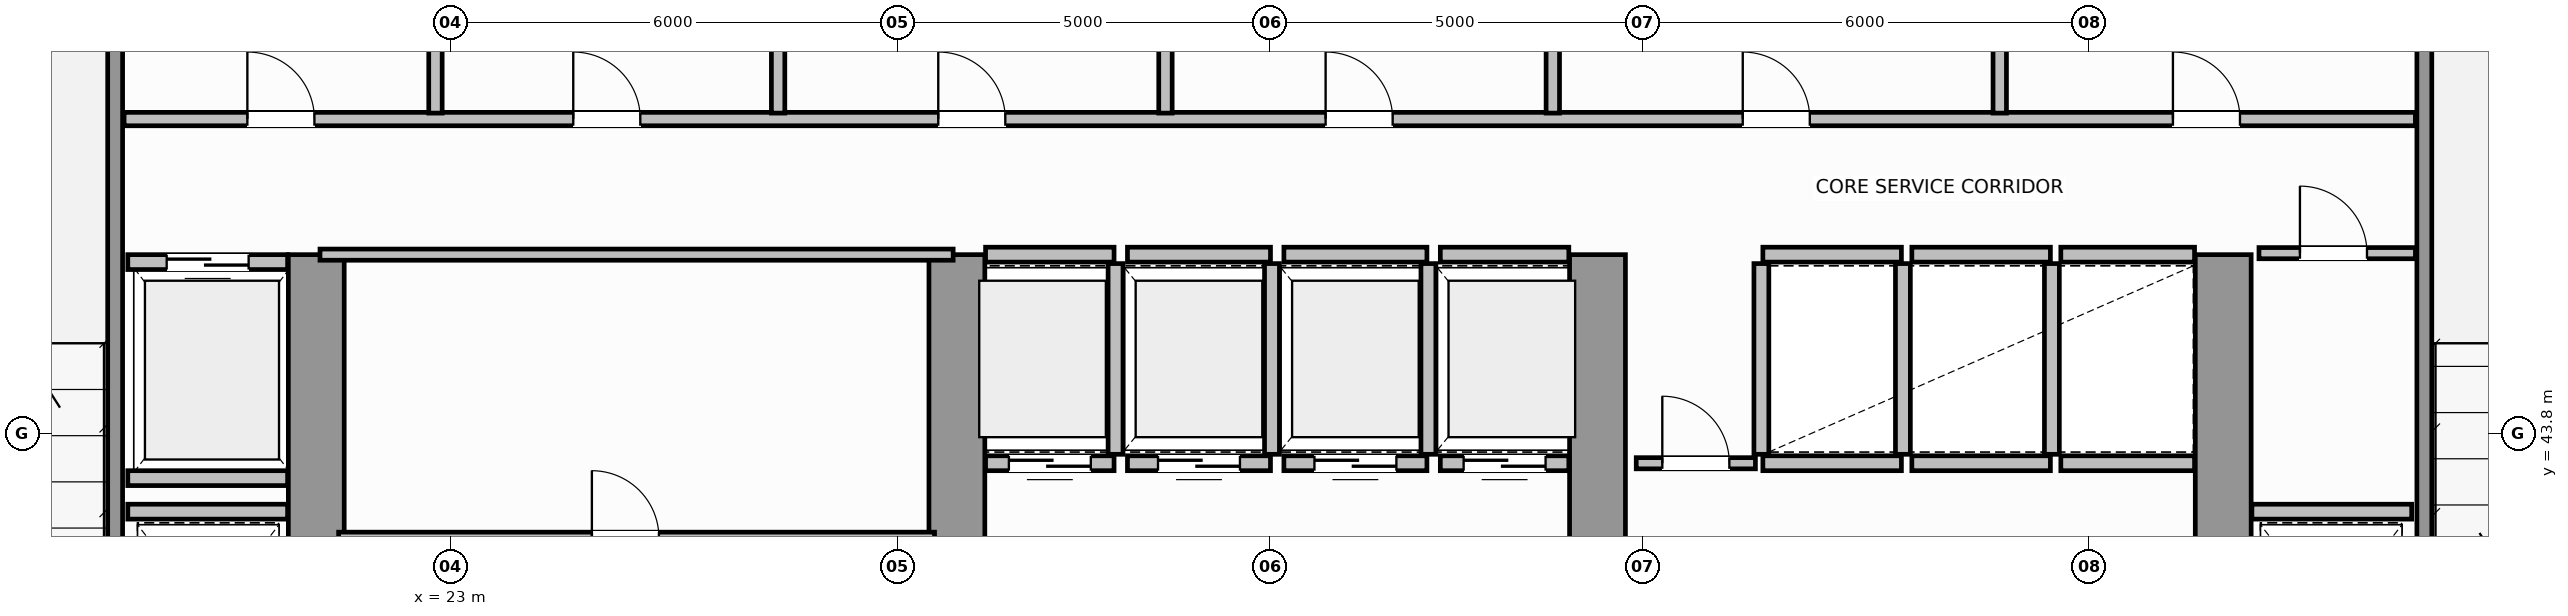
"""IFC4 building model, lengths in metres.
Left out: names, types, materials, properties, quantities, classifications, styles, units other than length and angle.
Written with IfcOpenShell. Run it as: python <this file> out.ifc"""

import sys

from ifc_helpers import new_model, si_unit, direction, frame, frame_2d, origin, place, context, subcontext, project, spatial, rectangle, extrude, source, transform, mapped, element, fill, save


model = new_model("IFC4")
c1 = context("Model", 3, precision=1e-05, world=origin(), true_north=direction((0.0, 1.0)))
c2 = subcontext(c1, "Body", "Model", "MODEL_VIEW")
j1 = project(units=[si_unit("LENGTHUNIT", "METRE"), si_unit("PLANEANGLEUNIT", "RADIAN")], contexts=[c1])
p1 = place(None, origin())
s1 = spatial("IfcSite", under=j1, at=p1, CompositionType="ELEMENT")
p2 = place(p1, origin())
s2 = spatial("IfcBuilding", under=s1, at=p2, CompositionType="ELEMENT")
p3 = place(p2, frame((0.0, 0.0, 157.6)))
s3 = spatial("IfcBuildingStorey", under=s2, at=p3, CompositionType="ELEMENT", Elevation=157.6)
for number, where, z_axis, x_axis in (
    (1, (21.2, 36.895, 0.0), (0.0, 0.0, 1.0), (0.0, 1.0, 0.0)),
    (2, (29.8, 36.895, 0.0), (0.0, 0.0, 1.0), (0.0, 1.0, 0.0)),
    (3, (38.4, 36.895, 0.0), (0.0, 0.0, 1.0), (0.0, 1.0, 0.0)),
    (4, (46.8, 36.895, 0.0), (0.0, 0.0, 1.0), (0.0, 1.0, 0.0)),
):
    element("IfcWall", number, at=place(p3, frame(where, z_axis=z_axis, x_axis=x_axis)), inside=s3, PredefinedType="SHEAR", context=c2, shape_type="SweptSolid", body=[
        extrude(rectangle(XDim=9.305, YDim=0.75, at=frame_2d((4.652, 0.0))), origin(), (0.0, 0.0, 1.0), 3.8),
    ])
for number, where, z_axis, x_axis in (
    (5, (18.5, 39.96, 0.0), (0.0, 0.0, 1.0), (0.0, 1.0, 0.0)),
    (6, (49.5, 39.96, 0.0), (0.0, 0.0, 1.0), (0.0, 1.0, 0.0)),
):
    element("IfcWall", number, at=place(p3, frame(where, z_axis=z_axis, x_axis=x_axis)), inside=s3, PredefinedType="SOLIDWALL", context=c2, shape_type="SweptSolid", body=[
        extrude(rectangle(XDim=9.93, YDim=0.2, at=frame_2d((4.965, 0.0))), origin(), (0.0, 0.0, 1.0), 3.8),
    ])
p4 = place(p3, frame((30.185, 43.4, 0.0), z_axis=(0.0, 0.0, 1.0), x_axis=(1.0, 0.0, 0.0)))
e7 = element("IfcWall", 7, at=p4, inside=s3, PredefinedType="SOLIDWALL", context=c2, shape_type="SweptSolid", body=[
    extrude(rectangle(XDim=1.725, YDim=0.2, at=frame_2d((0.862, 0.0))), origin(), (0.0, 0.0, 1.0), 3.58),
])
p5 = place(p4, frame((0.313, 0.0, 0.0)))
e8 = element("IfcOpeningElement", 8, at=p5, cuts=e7, PredefinedType="OPENING", context=c2, shape_type="SweptSolid", body=[
    extrude(rectangle(XDim=1.1, YDim=2.15, at=frame_2d((0.55, 1.075))), frame((0.0, 0.11, 0.0), z_axis=(0.0, -1.0, 0.0), x_axis=(1.0, 0.0, 0.0)), (0.0, 0.0, 1.0), 0.22),
])
p6 = place(p3, frame((30.185, 46.2, 0.0), z_axis=(0.0, 0.0, 1.0), x_axis=(1.0, 0.0, 0.0)))
e9 = element("IfcWall", 9, at=p6, inside=s3, PredefinedType="SOLIDWALL", context=c2, shape_type="SweptSolid", body=[
    extrude(rectangle(XDim=1.725, YDim=0.2, at=frame_2d((0.862, 0.0))), origin(), (0.0, 0.0, 1.0), 3.58),
])
p7 = place(p3, frame((31.93, 43.52, 0.0), z_axis=(0.0, 0.0, 1.0), x_axis=(0.0, 1.0, 0.0)))
e10 = element("IfcWall", 10, at=p7, inside=s3, PredefinedType="SOLIDWALL", context=c2, shape_type="SweptSolid", body=[
    extrude(rectangle(XDim=2.56, YDim=0.2, at=frame_2d((1.28, 0.0))), origin(), (0.0, 0.0, 1.0), 3.58),
])
p8 = place(p3, frame((32.09, 43.4, 0.0), z_axis=(0.0, 0.0, 1.0), x_axis=(1.0, 0.0, 0.0)))
e11 = element("IfcWall", 11, at=p8, inside=s3, PredefinedType="SOLIDWALL", context=c2, shape_type="SweptSolid", body=[
    extrude(rectangle(XDim=1.92, YDim=0.2, at=frame_2d((0.96, 0.0))), origin(), (0.0, 0.0, 1.0), 3.58),
])
p9 = place(p8, frame((0.41, 0.0, 0.0)))
e12 = element("IfcOpeningElement", 12, at=p9, cuts=e11, PredefinedType="OPENING", context=c2, shape_type="SweptSolid", body=[
    extrude(rectangle(XDim=1.1, YDim=2.15, at=frame_2d((0.55, 1.075))), frame((0.0, 0.11, 0.0), z_axis=(0.0, -1.0, 0.0), x_axis=(1.0, 0.0, 0.0)), (0.0, 0.0, 1.0), 0.22),
])
p10 = place(p3, frame((32.09, 46.2, 0.0), z_axis=(0.0, 0.0, 1.0), x_axis=(1.0, 0.0, 0.0)))
e13 = element("IfcWall", 13, at=p10, inside=s3, PredefinedType="SOLIDWALL", context=c2, shape_type="SweptSolid", body=[
    extrude(rectangle(XDim=1.92, YDim=0.2, at=frame_2d((0.96, 0.0))), origin(), (0.0, 0.0, 1.0), 3.58),
])
p11 = place(p3, frame((34.03, 43.52, 0.0), z_axis=(0.0, 0.0, 1.0), x_axis=(0.0, 1.0, 0.0)))
e14 = element("IfcWall", 14, at=p11, inside=s3, PredefinedType="SOLIDWALL", context=c2, shape_type="SweptSolid", body=[
    extrude(rectangle(XDim=2.56, YDim=0.2, at=frame_2d((1.28, 0.0))), origin(), (0.0, 0.0, 1.0), 3.58),
])
p12 = place(p3, frame((34.19, 43.4, 0.0), z_axis=(0.0, 0.0, 1.0), x_axis=(1.0, 0.0, 0.0)))
e15 = element("IfcWall", 15, at=p12, inside=s3, PredefinedType="SOLIDWALL", context=c2, shape_type="SweptSolid", body=[
    extrude(rectangle(XDim=1.92, YDim=0.2, at=frame_2d((0.96, 0.0))), origin(), (0.0, 0.0, 1.0), 3.58),
])
p13 = place(p12, frame((0.41, 0.0, 0.0)))
e16 = element("IfcOpeningElement", 16, at=p13, cuts=e15, PredefinedType="OPENING", context=c2, shape_type="SweptSolid", body=[
    extrude(rectangle(XDim=1.1, YDim=2.15, at=frame_2d((0.55, 1.075))), frame((0.0, 0.11, 0.0), z_axis=(0.0, -1.0, 0.0), x_axis=(1.0, 0.0, 0.0)), (0.0, 0.0, 1.0), 0.22),
])
p14 = place(p3, frame((34.19, 46.2, 0.0), z_axis=(0.0, 0.0, 1.0), x_axis=(1.0, 0.0, 0.0)))
e17 = element("IfcWall", 17, at=p14, inside=s3, PredefinedType="SOLIDWALL", context=c2, shape_type="SweptSolid", body=[
    extrude(rectangle(XDim=1.92, YDim=0.2, at=frame_2d((0.96, 0.0))), origin(), (0.0, 0.0, 1.0), 3.58),
])
p15 = place(p3, frame((36.13, 43.52, 0.0), z_axis=(0.0, 0.0, 1.0), x_axis=(0.0, 1.0, 0.0)))
e18 = element("IfcWall", 18, at=p15, inside=s3, PredefinedType="SOLIDWALL", context=c2, shape_type="SweptSolid", body=[
    extrude(rectangle(XDim=2.56, YDim=0.2, at=frame_2d((1.28, 0.0))), origin(), (0.0, 0.0, 1.0), 3.58),
])
p16 = place(p3, frame((36.29, 43.4, 0.0), z_axis=(0.0, 0.0, 1.0), x_axis=(1.0, 0.0, 0.0)))
e19 = element("IfcWall", 19, at=p16, inside=s3, PredefinedType="SOLIDWALL", context=c2, shape_type="SweptSolid", body=[
    extrude(rectangle(XDim=1.725, YDim=0.2, at=frame_2d((0.862, 0.0))), origin(), (0.0, 0.0, 1.0), 3.58),
])
p17 = place(p16, frame((0.313, 0.0, 0.0)))
e20 = element("IfcOpeningElement", 20, at=p17, cuts=e19, PredefinedType="OPENING", context=c2, shape_type="SweptSolid", body=[
    extrude(rectangle(XDim=1.1, YDim=2.15, at=frame_2d((0.55, 1.075))), frame((0.0, 0.11, 0.0), z_axis=(0.0, -1.0, 0.0), x_axis=(1.0, 0.0, 0.0)), (0.0, 0.0, 1.0), 0.22),
])
p18 = place(p3, frame((36.29, 46.2, 0.0), z_axis=(0.0, 0.0, 1.0), x_axis=(1.0, 0.0, 0.0)))
e21 = element("IfcWall", 21, at=p18, inside=s3, PredefinedType="SOLIDWALL", context=c2, shape_type="SweptSolid", body=[
    extrude(rectangle(XDim=1.725, YDim=0.2, at=frame_2d((0.862, 0.0))), origin(), (0.0, 0.0, 1.0), 3.58),
])
for number, where, z_axis, x_axis in (
    (22, (40.62, 43.4, 0.0), (0.0, 0.0, 1.0), (1.0, 0.0, 0.0)),
    (23, (40.62, 46.2, 0.0), (0.0, 0.0, 1.0), (1.0, 0.0, 0.0)),
):
    element("IfcWall", number, at=place(p3, frame(where, z_axis=z_axis, x_axis=x_axis)), inside=s3, PredefinedType="SOLIDWALL", context=c2, shape_type="SweptSolid", body=[
        extrude(rectangle(XDim=1.86, YDim=0.2, at=frame_2d((0.93, 0.0))), origin(), (0.0, 0.0, 1.0), 3.58),
    ])
for number, where, z_axis, x_axis in (
    (24, (40.6, 43.52, 0.0), (0.0, 0.0, 1.0), (0.0, 1.0, 0.0)),
    (25, (42.5, 43.52, 0.0), (0.0, 0.0, 1.0), (0.0, 1.0, 0.0)),
):
    element("IfcWall", number, at=place(p3, frame(where, z_axis=z_axis, x_axis=x_axis)), inside=s3, PredefinedType="SOLIDWALL", context=c2, shape_type="SweptSolid", body=[
        extrude(rectangle(XDim=2.56, YDim=0.2, at=frame_2d((1.28, 0.0))), origin(), (0.0, 0.0, 1.0), 3.58),
    ])
for number, where, z_axis, x_axis in (
    (26, (42.62, 43.4, 0.0), (0.0, 0.0, 1.0), (1.0, 0.0, 0.0)),
    (27, (42.62, 46.2, 0.0), (0.0, 0.0, 1.0), (1.0, 0.0, 0.0)),
):
    element("IfcWall", number, at=place(p3, frame(where, z_axis=z_axis, x_axis=x_axis)), inside=s3, PredefinedType="SOLIDWALL", context=c2, shape_type="SweptSolid", body=[
        extrude(rectangle(XDim=1.86, YDim=0.2, at=frame_2d((0.93, 0.0))), origin(), (0.0, 0.0, 1.0), 3.58),
    ])
p19 = place(p3, frame((44.5, 43.52, 0.0), z_axis=(0.0, 0.0, 1.0), x_axis=(0.0, 1.0, 0.0)))
e28 = element("IfcWall", 28, at=p19, inside=s3, PredefinedType="SOLIDWALL", context=c2, shape_type="SweptSolid", body=[
    extrude(rectangle(XDim=2.56, YDim=0.2, at=frame_2d((1.28, 0.0))), origin(), (0.0, 0.0, 1.0), 3.58),
])
for number, where, z_axis, x_axis in (
    (29, (44.62, 43.4, 0.0), (0.0, 0.0, 1.0), (1.0, 0.0, 0.0)),
    (30, (44.62, 46.2, 0.0), (0.0, 0.0, 1.0), (1.0, 0.0, 0.0)),
):
    element("IfcWall", number, at=place(p3, frame(where, z_axis=z_axis, x_axis=x_axis)), inside=s3, PredefinedType="SOLIDWALL", context=c2, shape_type="SweptSolid", body=[
        extrude(rectangle(XDim=1.795, YDim=0.2, at=frame_2d((0.897, 0.0))), origin(), (0.0, 0.0, 1.0), 3.58),
    ])
p20 = place(p3, frame((18.67, 46.1, 0.0), z_axis=(0.0, 0.0, 1.0), x_axis=(1.0, 0.0, 0.0)))
e31 = element("IfcWall", 31, at=p20, inside=s3, PredefinedType="SOLIDWALL", context=c2, shape_type="SweptSolid", body=[
    extrude(rectangle(XDim=2.145, YDim=0.2, at=frame_2d((1.073, 0.0))), origin(), (0.0, 0.0, 1.0), 3.58),
])
p21 = place(p20, frame((0.522, 0.0, 0.0)))
e32 = element("IfcOpeningElement", 32, at=p21, cuts=e31, PredefinedType="OPENING", context=c2, shape_type="SweptSolid", body=[
    extrude(rectangle(XDim=1.1, YDim=2.15, at=frame_2d((0.55, 1.075))), frame((0.0, 0.11, 0.0), z_axis=(0.0, -1.0, 0.0), x_axis=(1.0, 0.0, 0.0)), (0.0, 0.0, 1.0), 0.22),
])
for number, where, z_axis, x_axis in (
    (33, (18.67, 43.2, 0.0), (0.0, 0.0, 1.0), (1.0, 0.0, 0.0)),
    (34, (18.67, 42.75, 0.0), (0.0, 0.0, 1.0), (1.0, 0.0, 0.0)),
    (35, (47.185, 42.75, 0.0), (0.0, 0.0, 1.0), (1.0, 0.0, 0.0)),
):
    element("IfcWall", number, at=place(p3, frame(where, z_axis=z_axis, x_axis=x_axis)), inside=s3, PredefinedType="SOLIDWALL", context=c2, shape_type="SweptSolid", body=[
        extrude(rectangle(XDim=2.145, YDim=0.2, at=frame_2d((1.073, 0.0))), origin(), (0.0, 0.0, 1.0), 3.58),
    ])
p22 = place(p3, frame((21.25, 46.2, 0.0), z_axis=(0.0, 0.0, 1.0), x_axis=(1.0, 0.0, 0.0)))
e36 = element("IfcWall", 36, at=p22, inside=s3, PredefinedType="PARTITIONING", context=c2, shape_type="SweptSolid", body=[
    extrude(rectangle(XDim=8.5, YDim=0.15, at=frame_2d((4.25, 0.0))), origin(), (0.0, 0.0, 1.0), 3.58),
])
p23 = place(p3, frame((21.5, 42.4, 0.0), z_axis=(0.0, 0.0, 1.0), x_axis=(1.0, 0.0, 0.0)))
e37 = element("IfcWall", 37, at=p23, inside=s3, PredefinedType="PARTITIONING", context=c2, shape_type="SweptSolid", body=[
    extrude(rectangle(XDim=8.0, YDim=0.15, at=frame_2d((4.0, 0.0))), origin(), (0.0, 0.0, 1.0), 3.58),
])
p24 = place(p23, frame((3.4, 0.0, 0.0)))
e38 = element("IfcOpeningElement", 38, at=p24, cuts=e37, PredefinedType="OPENING", context=c2, shape_type="SweptSolid", body=[
    extrude(rectangle(XDim=0.9, YDim=2.1, at=frame_2d((0.45, 1.05))), frame((0.0, 0.085, 0.0), z_axis=(0.0, -1.0, 0.0), x_axis=(1.0, 0.0, 0.0)), (0.0, 0.0, 1.0), 0.17),
])
p25 = place(p3, frame((47.28, 46.22, 0.0), z_axis=(0.0, 0.0, 1.0), x_axis=(1.0, 0.0, 0.0)))
e39 = element("IfcWall", 39, at=p25, inside=s3, PredefinedType="PARTITIONING", context=c2, shape_type="SweptSolid", body=[
    extrude(rectangle(XDim=2.1, YDim=0.15, at=frame_2d((1.05, 0.0))), origin(), (0.0, 0.0, 1.0), 3.58),
])
p26 = place(p25, frame((0.55, 0.0, 0.0)))
e40 = element("IfcOpeningElement", 40, at=p26, cuts=e39, PredefinedType="OPENING", context=c2, shape_type="SweptSolid", body=[
    extrude(rectangle(XDim=0.9, YDim=2.1, at=frame_2d((0.45, 1.05))), frame((0.0, 0.085, 0.0), z_axis=(0.0, -1.0, 0.0), x_axis=(1.0, 0.0, 0.0)), (0.0, 0.0, 1.0), 0.17),
])
p27 = place(p3, frame((38.92, 43.4, 0.0), z_axis=(0.0, 0.0, 1.0), x_axis=(1.0, 0.0, 0.0)))
e41 = element("IfcWall", 41, at=p27, inside=s3, PredefinedType="PARTITIONING", context=c2, shape_type="SweptSolid", body=[
    extrude(rectangle(XDim=1.6, YDim=0.15, at=frame_2d((0.8, 0.0))), origin(), (0.0, 0.0, 1.0), 3.58),
])
p28 = place(p27, frame((0.35, 0.0, 0.0)))
e42 = element("IfcOpeningElement", 42, at=p28, cuts=e41, PredefinedType="OPENING", context=c2, shape_type="SweptSolid", body=[
    extrude(rectangle(XDim=0.9, YDim=2.1, at=frame_2d((0.45, 1.05))), frame((0.0, 0.085, 0.0), z_axis=(0.0, -1.0, 0.0), x_axis=(1.0, 0.0, 0.0)), (0.0, 0.0, 1.0), 0.17),
])
p29 = place(p3, frame((18.62, 48.02, 0.0), z_axis=(0.0, 0.0, 1.0), x_axis=(1.0, 0.0, 0.0)))
e43 = element("IfcWall", 43, at=p29, inside=s3, PredefinedType="PLUMBINGWALL", context=c2, shape_type="SweptSolid", body=[
    extrude(rectangle(XDim=30.76, YDim=0.18, at=frame_2d((15.38, 0.0))), origin(), (0.0, 0.0, 1.0), 3.58),
])
p30 = place(p29, frame((1.655, 0.0, 0.0)))
e44 = element("IfcOpeningElement", 44, at=p30, cuts=e43, PredefinedType="OPENING", context=c2, shape_type="SweptSolid", body=[
    extrude(rectangle(XDim=0.9, YDim=2.15, at=frame_2d((0.45, 1.075))), frame((0.0, 0.1, 0.0), z_axis=(0.0, -1.0, 0.0), x_axis=(1.0, 0.0, 0.0)), (0.0, 0.0, 1.0), 0.2),
])
p31 = place(p29, frame((6.03, 0.0, 0.0)))
e45 = element("IfcOpeningElement", 45, at=p31, cuts=e43, PredefinedType="OPENING", context=c2, shape_type="SweptSolid", body=[
    extrude(rectangle(XDim=0.9, YDim=2.15, at=frame_2d((0.45, 1.075))), frame((0.0, 0.1, 0.0), z_axis=(0.0, -1.0, 0.0), x_axis=(1.0, 0.0, 0.0)), (0.0, 0.0, 1.0), 0.2),
])
p32 = place(p29, frame((10.93, 0.0, 0.0)))
e46 = element("IfcOpeningElement", 46, at=p32, cuts=e43, PredefinedType="OPENING", context=c2, shape_type="SweptSolid", body=[
    extrude(rectangle(XDim=0.9, YDim=2.15, at=frame_2d((0.45, 1.075))), frame((0.0, 0.1, 0.0), z_axis=(0.0, -1.0, 0.0), x_axis=(1.0, 0.0, 0.0)), (0.0, 0.0, 1.0), 0.2),
])
p33 = place(p29, frame((16.13, 0.0, 0.0)))
e47 = element("IfcOpeningElement", 47, at=p33, cuts=e43, PredefinedType="OPENING", context=c2, shape_type="SweptSolid", body=[
    extrude(rectangle(XDim=0.9, YDim=2.15, at=frame_2d((0.45, 1.075))), frame((0.0, 0.1, 0.0), z_axis=(0.0, -1.0, 0.0), x_axis=(1.0, 0.0, 0.0)), (0.0, 0.0, 1.0), 0.2),
])
p34 = place(p29, frame((21.73, 0.0, 0.0)))
e48 = element("IfcOpeningElement", 48, at=p34, cuts=e43, PredefinedType="OPENING", context=c2, shape_type="SweptSolid", body=[
    extrude(rectangle(XDim=0.9, YDim=2.15, at=frame_2d((0.45, 1.075))), frame((0.0, 0.1, 0.0), z_axis=(0.0, -1.0, 0.0), x_axis=(1.0, 0.0, 0.0)), (0.0, 0.0, 1.0), 0.2),
])
p35 = place(p29, frame((27.505, 0.0, 0.0)))
e49 = element("IfcOpeningElement", 49, at=p35, cuts=e43, PredefinedType="OPENING", context=c2, shape_type="SweptSolid", body=[
    extrude(rectangle(XDim=0.9, YDim=2.15, at=frame_2d((0.45, 1.075))), frame((0.0, 0.1, 0.0), z_axis=(0.0, -1.0, 0.0), x_axis=(1.0, 0.0, 0.0)), (0.0, 0.0, 1.0), 0.2),
])
p36 = place(p3, frame((22.8, 48.1, 0.0), z_axis=(0.0, 0.0, 1.0), x_axis=(0.0, 1.0, 0.0)))
e50 = element("IfcWall", 50, at=p36, inside=s3, PredefinedType="PLUMBINGWALL", context=c2, shape_type="SweptSolid", body=[
    extrude(rectangle(XDim=2.13, YDim=0.18, at=frame_2d((1.065, 0.0))), origin(), (0.0, 0.0, 1.0), 2.97),
])
for number, where, z_axis, x_axis in (
    (51, (27.4, 48.1, 0.0), (0.0, 0.0, 1.0), (0.0, 1.0, 0.0)),
    (52, (32.6, 48.1, 0.0), (0.0, 0.0, 1.0), (0.0, 1.0, 0.0)),
    (53, (37.8, 48.1, 0.0), (0.0, 0.0, 1.0), (0.0, 1.0, 0.0)),
    (54, (43.8, 48.1, 0.0), (0.0, 0.0, 1.0), (0.0, 1.0, 0.0)),
):
    element("IfcWall", number, at=place(p3, frame(where, z_axis=z_axis, x_axis=x_axis)), inside=s3, PredefinedType="PLUMBINGWALL", context=c2, shape_type="SweptSolid", body=[
        extrude(rectangle(XDim=2.13, YDim=0.18, at=frame_2d((1.065, 0.0))), origin(), (0.0, 0.0, 1.0), 3.58),
    ])
m1 = source(origin(), c2, "Body", "SweptSolid", [
    extrude(rectangle(XDim=1.1, YDim=2.15, at=frame_2d((0.55, 1.075))), frame((0.0, 0.025, 0.0), z_axis=(0.0, -1.0, 0.0), x_axis=(1.0, 0.0, 0.0)), (0.0, 0.0, 1.0), 0.05),
])
p37 = place(p5, origin())
e55 = element("IfcDoor", 55, at=p37, inside=s3, OperationType="DOUBLE_DOOR_SLIDING", PredefinedType="DOOR", context=c2, shape_type="MappedRepresentation", body=[
    mapped(m1, transform((0.0, 0.0, 0.0), scale=1.0)),
])
fill(e8, e55)
p38 = place(p9, origin())
e56 = element("IfcDoor", 56, at=p38, inside=s3, OperationType="DOUBLE_DOOR_SLIDING", PredefinedType="DOOR", context=c2, shape_type="MappedRepresentation", body=[
    mapped(m1, transform((0.0, 0.0, 0.0), scale=1.0)),
])
fill(e12, e56)
p39 = place(p13, origin())
e57 = element("IfcDoor", 57, at=p39, inside=s3, OperationType="DOUBLE_DOOR_SLIDING", PredefinedType="DOOR", context=c2, shape_type="MappedRepresentation", body=[
    mapped(m1, transform((0.0, 0.0, 0.0), scale=1.0)),
])
fill(e16, e57)
p40 = place(p17, origin())
e58 = element("IfcDoor", 58, at=p40, inside=s3, OperationType="DOUBLE_DOOR_SLIDING", PredefinedType="DOOR", context=c2, shape_type="MappedRepresentation", body=[
    mapped(m1, transform((0.0, 0.0, 0.0), scale=1.0)),
])
fill(e20, e58)
p41 = place(p21, origin())
e59 = element("IfcDoor", 59, at=p41, inside=s3, OperationType="DOUBLE_DOOR_SLIDING", PredefinedType="DOOR", context=c2, shape_type="MappedRepresentation", body=[
    mapped(m1, transform((0.0, 0.0, 0.0), scale=1.0)),
])
fill(e32, e59)
m2 = source(origin(), c2, "Body", "SweptSolid", [
    extrude(rectangle(XDim=0.9, YDim=2.1, at=frame_2d((0.45, 1.05))), frame((0.0, 0.025, 0.0), z_axis=(0.0, -1.0, 0.0), x_axis=(1.0, 0.0, 0.0)), (0.0, 0.0, 1.0), 0.05),
])
p42 = place(p24, origin())
e60 = element("IfcDoor", 60, at=p42, inside=s3, OperationType="SINGLE_SWING_RIGHT", PredefinedType="DOOR", context=c2, shape_type="MappedRepresentation", body=[
    mapped(m2, transform((0.0, 0.0, 0.0), scale=1.0)),
])
fill(e38, e60)
p43 = place(p26, origin())
e61 = element("IfcDoor", 61, at=p43, inside=s3, OperationType="SINGLE_SWING_RIGHT", PredefinedType="DOOR", context=c2, shape_type="MappedRepresentation", body=[
    mapped(m2, transform((0.0, 0.0, 0.0), scale=1.0)),
])
fill(e40, e61)
p44 = place(p28, origin())
e62 = element("IfcDoor", 62, at=p44, inside=s3, OperationType="SINGLE_SWING_LEFT", PredefinedType="DOOR", context=c2, shape_type="MappedRepresentation", body=[
    mapped(m2, transform((0.0, 0.0, 0.0), scale=1.0)),
])
fill(e42, e62)
m3 = source(origin(), c2, "Body", "SweptSolid", [
    extrude(rectangle(XDim=0.9, YDim=2.15, at=frame_2d((0.45, 1.075))), frame((0.0, 0.025, 0.0), z_axis=(0.0, -1.0, 0.0), x_axis=(1.0, 0.0, 0.0)), (0.0, 0.0, 1.0), 0.05),
])
p45 = place(p30, origin())
e63 = element("IfcDoor", 63, at=p45, inside=s3, OperationType="SINGLE_SWING_LEFT", PredefinedType="DOOR", context=c2, shape_type="MappedRepresentation", body=[
    mapped(m3, transform((0.0, 0.0, 0.0), scale=1.0)),
])
fill(e44, e63)
p46 = place(p31, origin())
e64 = element("IfcDoor", 64, at=p46, inside=s3, OperationType="SINGLE_SWING_RIGHT", PredefinedType="DOOR", context=c2, shape_type="MappedRepresentation", body=[
    mapped(m3, transform((0.0, 0.0, 0.0), scale=1.0)),
])
fill(e45, e64)
p47 = place(p32, origin())
e65 = element("IfcDoor", 65, at=p47, inside=s3, OperationType="SINGLE_SWING_LEFT", PredefinedType="DOOR", context=c2, shape_type="MappedRepresentation", body=[
    mapped(m3, transform((0.0, 0.0, 0.0), scale=1.0)),
])
fill(e46, e65)
p48 = place(p33, origin())
e66 = element("IfcDoor", 66, at=p48, inside=s3, OperationType="SINGLE_SWING_RIGHT", PredefinedType="DOOR", context=c2, shape_type="MappedRepresentation", body=[
    mapped(m3, transform((0.0, 0.0, 0.0), scale=1.0)),
])
fill(e47, e66)
p49 = place(p34, origin())
e67 = element("IfcDoor", 67, at=p49, inside=s3, OperationType="SINGLE_SWING_LEFT", PredefinedType="DOOR", context=c2, shape_type="MappedRepresentation", body=[
    mapped(m3, transform((0.0, 0.0, 0.0), scale=1.0)),
])
fill(e48, e67)
p50 = place(p35, origin())
e68 = element("IfcDoor", 68, at=p50, inside=s3, OperationType="SINGLE_SWING_RIGHT", PredefinedType="DOOR", context=c2, shape_type="MappedRepresentation", body=[
    mapped(m3, transform((0.0, 0.0, 0.0), scale=1.0)),
])
fill(e49, e68)
save(model, sys.argv[1])
